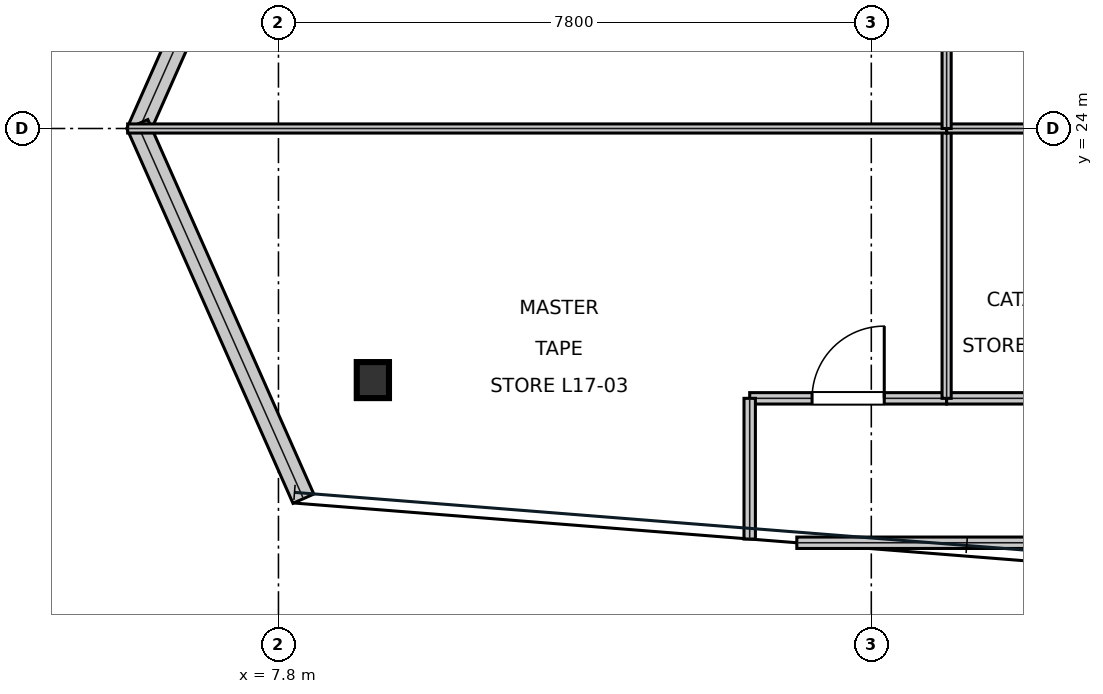
"""IFC4 building model, lengths in metres.
Left out: names, types, materials, properties, quantities, classifications, styles, units other than length and angle.
Written with IfcOpenShell. Run it as: python <this file> out.ifc"""

import sys

from ifc_helpers import new_model, si_unit, direction, frame, frame_2d, origin, origin_2d, place, context, subcontext, project, spatial, rectangle, i_section, extrude, element, fill, save


model = new_model("IFC4")
c1 = context("Model", 3, precision=1e-05, world=origin(), true_north=direction((0.0, 1.0)))
c2 = subcontext(c1, "Body", "Model", "MODEL_VIEW")
j1 = project(units=[si_unit("LENGTHUNIT", "METRE"), si_unit("PLANEANGLEUNIT", "RADIAN")], contexts=[c1])
p1 = place(None, origin())
s1 = spatial("IfcSite", under=j1, at=p1, CompositionType="ELEMENT")
p2 = place(p1, origin())
s2 = spatial("IfcBuilding", under=s1, at=p2, CompositionType="ELEMENT")
p3 = place(p2, frame((0.0, 0.0, 78.3)))
s3 = spatial("IfcBuildingStorey", under=s2, at=p3, CompositionType="ELEMENT", Elevation=78.3)
p4 = place(p3, frame((9.042, 20.69, 0.016), z_axis=(0.0, 0.0, 1.0), x_axis=(1.0, 0.0, 0.0)))
e1 = element("IfcColumn", 1, at=p4, inside=s3, PredefinedType="COLUMN", context=c2, shape_type="SweptSolid", body=[
    extrude(i_section(OverallWidth=0.424, OverallDepth=0.474, WebThickness=0.048, FlangeThickness=0.077, at=origin_2d()), origin(), (0.0, 0.0, 1.0), 4.018),
])
for number, where, z_axis, x_axis in (
    (2, (8.128, 28.87, 0.0), (0.0, 0.0, 1.0), (-0.405, -0.914, 0.0)),
    (3, (5.944, 24.057, 0.0), (0.0, 0.0, 1.0), (0.405, -0.914, 0.0)),
):
    element("IfcWall", number, at=place(p3, frame(where, z_axis=z_axis, x_axis=x_axis)), inside=s3, PredefinedType="STANDARD", context=c2, shape_type="SweptSolid", body=[
        extrude(rectangle(XDim=5.389, YDim=0.3, at=frame_2d((2.695, 0.0))), origin(), (0.0, 0.0, 1.0), 3.81),
    ])
p5 = place(p3, frame((14.62, 18.55, 0.0), z_axis=(0.0, 0.0, 1.0), x_axis=(1.0, 0.0, 0.0)))
e4 = element("IfcWall", 4, at=p5, inside=s3, PredefinedType="PARTITIONING", context=c2, shape_type="SweptSolid", body=[
    extrude(rectangle(XDim=17.364, YDim=0.15, at=frame_2d((8.682, 0.0))), origin(), (0.0, 0.0, 1.0), 3.181),
])
p6 = place(p5, frame((11.987, 0.0, 0.0)))
e5 = element("IfcOpeningElement", 5, at=p6, cuts=e4, PredefinedType="OPENING", context=c2, shape_type="SweptSolid", body=[
    extrude(rectangle(XDim=0.95, YDim=2.15, at=frame_2d((0.475, 1.075))), frame((0.0, 0.085, 0.0), z_axis=(0.0, -1.0, 0.0), x_axis=(1.0, 0.0, 0.0)), (0.0, 0.0, 1.0), 0.17),
])
p7 = place(p3, frame((14.0, 20.45, 0.0), z_axis=(0.0, 0.0, 1.0), x_axis=(1.0, 0.0, 0.0)))
e6 = element("IfcWall", 6, at=p7, inside=s3, PredefinedType="PARTITIONING", context=c2, shape_type="SweptSolid", body=[
    extrude(rectangle(XDim=2.591, YDim=0.15, at=frame_2d((1.295, 0.0))), origin(), (0.0, 0.0, 1.0), 3.391),
])
p8 = place(p7, frame((0.821, 0.0, 0.0)))
e7 = element("IfcOpeningElement", 7, at=p8, cuts=e6, PredefinedType="OPENING", context=c2, shape_type="SweptSolid", body=[
    extrude(rectangle(XDim=0.95, YDim=2.15, at=frame_2d((0.475, 1.075))), frame((0.0, 0.085, 0.0), z_axis=(0.0, -1.0, 0.0), x_axis=(1.0, 0.0, 0.0)), (0.0, 0.0, 1.0), 0.17),
])
p9 = place(p3, frame((14.0, 18.599, 0.0), z_axis=(0.0, 0.0, 1.0), x_axis=(0.0, 1.0, 0.0)))
e8 = element("IfcWall", 8, at=p9, inside=s3, PredefinedType="PARTITIONING", context=c2, shape_type="SweptSolid", body=[
    extrude(rectangle(XDim=1.851, YDim=0.15, at=frame_2d((0.925, 0.0))), origin(), (0.0, 0.0, 1.0), 3.338),
])
p10 = place(p3, frame((16.591, 20.45, 0.0), z_axis=(0.0, 0.0, 1.0), x_axis=(1.0, 0.0, 0.0)))
e9 = element("IfcWall", 9, at=p10, inside=s3, PredefinedType="PARTITIONING", context=c2, shape_type="SweptSolid", body=[
    extrude(rectangle(XDim=2.909, YDim=0.15, at=frame_2d((1.455, 0.0))), origin(), (0.0, 0.0, 1.0), 3.81),
])
p11 = place(p3, frame((16.591, 20.45, 0.0), z_axis=(0.0, 0.0, 1.0), x_axis=(0.0, 1.0, 0.0)))
e10 = element("IfcWall", 10, at=p11, inside=s3, PredefinedType="PARTITIONING", context=c2, shape_type="SweptSolid", body=[
    extrude(rectangle(XDim=3.55, YDim=0.12, at=frame_2d((1.775, 0.0))), origin(), (0.0, 0.0, 1.0), 3.181),
])
p12 = place(p3, frame((5.816, 24.0, 0.0), z_axis=(0.0, 0.0, 1.0), x_axis=(1.0, 0.0, 0.0)))
e11 = element("IfcWall", 11, at=p12, inside=s3, PredefinedType="PARTITIONING", context=c2, shape_type="SweptSolid", body=[
    extrude(rectangle(XDim=10.775, YDim=0.12, at=frame_2d((5.388, 0.0))), origin(), (0.0, 0.0, 1.0), 3.338),
])
p13 = place(p3, frame((16.591, 24.0, 0.0), z_axis=(0.0, 0.0, 1.0), x_axis=(1.0, 0.0, 0.0)))
e12 = element("IfcWall", 12, at=p13, inside=s3, PredefinedType="PARTITIONING", context=c2, shape_type="SweptSolid", body=[
    extrude(rectangle(XDim=2.909, YDim=0.12, at=frame_2d((1.455, 0.0))), origin(), (0.0, 0.0, 1.0), 3.391),
])
p14 = place(p3, frame((16.591, 24.0, 0.0), z_axis=(0.0, 0.0, 1.0), x_axis=(0.0, 1.0, 0.0)))
e13 = element("IfcWall", 13, at=p14, inside=s3, PredefinedType="PARTITIONING", context=c2, shape_type="SweptSolid", body=[
    extrude(rectangle(XDim=3.55, YDim=0.12, at=frame_2d((1.775, 0.0))), origin(), (0.0, 0.0, 1.0), 3.181),
])
p15 = place(p8, origin())
e14 = element("IfcDoor", 14, at=p15, inside=s3, OperationType="SINGLE_SWING_RIGHT", PredefinedType="DOOR", context=c2, shape_type="SweptSolid", body=[
    extrude(rectangle(XDim=0.95, YDim=2.15, at=frame_2d((0.475, 1.075))), frame((0.0, 0.025, 0.0), z_axis=(0.0, -1.0, 0.0), x_axis=(1.0, 0.0, 0.0)), (0.0, 0.0, 1.0), 0.05),
])
fill(e7, e14)
save(model, sys.argv[1])
